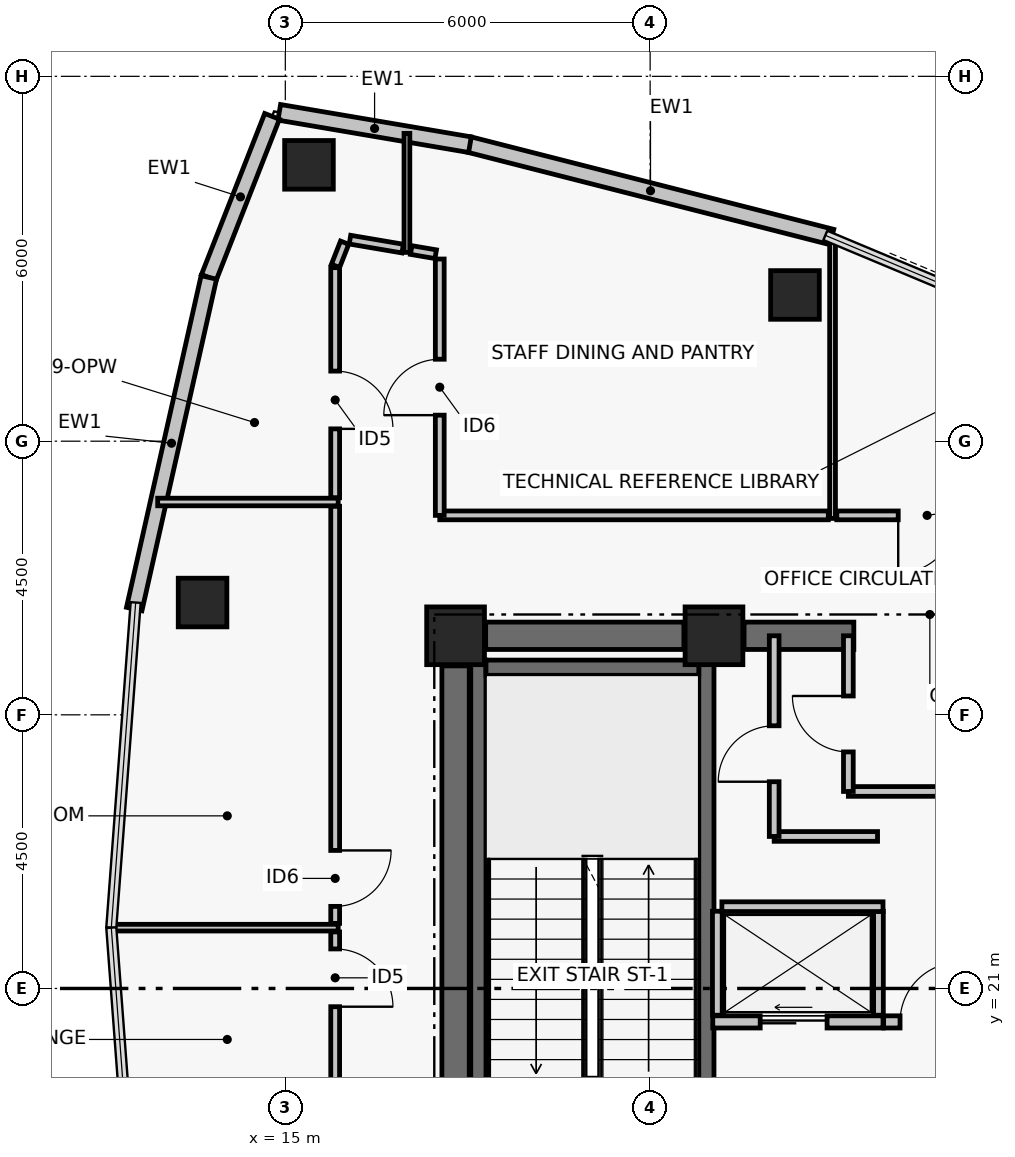
"""IFC4 building model, lengths in metres.
Left out: names, types, materials, properties, quantities, classifications, styles, units other than length and angle.
Written with IfcOpenShell. Run it as: python <this file> out.ifc"""

import sys

from ifc_helpers import new_model, si_unit, direction, frame, frame_2d, origin, origin_2d, place, context, subcontext, project, spatial, rectangle, hollow_rectangle, extrude, element, fill, save


model = new_model("IFC4")
c1 = context("Model", 3, precision=1e-05, world=origin(), true_north=direction((0.0, 1.0)))
c2 = subcontext(c1, "Body", "Model", "MODEL_VIEW")
j1 = project(units=[si_unit("LENGTHUNIT", "METRE"), si_unit("PLANEANGLEUNIT", "RADIAN")], contexts=[c1])
p1 = place(None, origin())
s1 = spatial("IfcSite", under=j1, at=p1, CompositionType="ELEMENT")
p2 = place(p1, origin())
s2 = spatial("IfcBuilding", under=s1, at=p2, CompositionType="ELEMENT")
p3 = place(p2, frame((0.0, 0.0, 291.78)))
s3 = spatial("IfcBuildingStorey", under=s2, at=p3, CompositionType="ELEMENT", Elevation=291.78)
for number, where, z_axis, x_axis in (
    (1, (17.8, 26.8, 0.0), (0.0, 0.0, 1.0), (1.0, 0.0, 0.0)),
    (2, (22.05, 26.8, 0.0), (0.0, 0.0, 1.0), (1.0, 0.0, 0.0)),
):
    element("IfcColumn", number, at=place(p3, frame(where, z_axis=z_axis, x_axis=x_axis)), inside=s3, PredefinedType="COLUMN", context=c2, shape_type="SweptSolid", body=[
        extrude(rectangle(XDim=0.95, YDim=0.95, at=origin_2d()), origin(), (0.0, 0.0, 1.0), 3.72),
    ])
p4 = place(p3, frame((18.295, 26.8, 0.0), z_axis=(0.0, 0.0, 1.0), x_axis=(1.0, 0.0, 0.0)))
e3 = element("IfcWall", 3, at=p4, inside=s3, PredefinedType="SHEAR", context=c2, shape_type="SweptSolid", body=[
    extrude(rectangle(XDim=3.26, YDim=0.45, at=frame_2d((1.63, 0.0))), origin(), (0.0, 0.0, 1.0), 3.5),
])
p5 = place(p3, frame((22.545, 26.8, 0.0), z_axis=(0.0, 0.0, 1.0), x_axis=(1.0, 0.0, 0.0)))
e4 = element("IfcWall", 4, at=p5, inside=s3, PredefinedType="SHEAR", context=c2, shape_type="SweptSolid", body=[
    extrude(rectangle(XDim=1.805, YDim=0.45, at=frame_2d((0.903, 0.0))), origin(), (0.0, 0.0, 1.0), 3.5),
])
p6 = place(p3, frame((17.8, 17.695, 0.0), z_axis=(0.0, 0.0, 1.0), x_axis=(0.0, 1.0, 0.0)))
e5 = element("IfcWall", 5, at=p6, inside=s3, PredefinedType="SHEAR", context=c2, shape_type="SweptSolid", body=[
    extrude(rectangle(XDim=8.61, YDim=0.45, at=frame_2d((4.305, 0.0))), origin(), (0.0, 0.0, 1.0), 3.5),
])
p7 = place(p3, frame((18.175, 17.6, 0.0), z_axis=(0.0, 0.0, 1.0), x_axis=(0.0, 1.0, 0.0)))
e6 = element("IfcWall", 6, at=p7, inside=s3, PredefinedType="SHEAR", context=c2, shape_type="SweptSolid", body=[
    extrude(rectangle(XDim=8.8, YDim=0.25, at=frame_2d((4.4, 0.0))), origin(), (0.0, 0.0, 1.0), 3.5),
])
p8 = place(p3, frame((21.925, 17.6, 0.0), z_axis=(0.0, 0.0, 1.0), x_axis=(0.0, 1.0, 0.0)))
e7 = element("IfcWall", 7, at=p8, inside=s3, PredefinedType="SHEAR", context=c2, shape_type="SweptSolid", body=[
    extrude(rectangle(XDim=8.8, YDim=0.25, at=frame_2d((4.4, 0.0))), origin(), (0.0, 0.0, 1.0), 3.5),
])
p9 = place(p8, frame((0.35, 0.0, 0.0)))
e8 = element("IfcOpeningElement", 8, at=p9, cuts=e7, PredefinedType="OPENING", context=c2, shape_type="SweptSolid", body=[
    extrude(rectangle(XDim=1.05, YDim=2.08, at=frame_2d((0.525, 1.04))), frame((0.0, 0.135, 0.0), z_axis=(0.0, -1.0, 0.0), x_axis=(1.0, 0.0, 0.0)), (0.0, 0.0, 1.0), 0.27),
])
p10 = place(p3, frame((18.3, 26.275, 0.0), z_axis=(0.0, 0.0, 1.0), x_axis=(1.0, 0.0, 0.0)))
e9 = element("IfcWall", 9, at=p10, inside=s3, PredefinedType="SHEAR", context=c2, shape_type="SweptSolid", body=[
    extrude(rectangle(XDim=3.5, YDim=0.25, at=frame_2d((1.75, 0.0))), origin(), (0.0, 0.0, 1.0), 3.5),
])
for number, where, z_axis, x_axis in (
    (10, (23.382, 32.405, 0.0), (0.0, 0.0, 1.0), (1.0, 0.0, 0.0)),
    (11, (15.389, 34.545, 0.0), (0.0, 0.0, 1.0), (1.0, 0.0, 0.0)),
    (12, (13.639, 27.347, 0.0), (0.0, 0.0, 1.0), (1.0, 0.0, 0.0)),
):
    element("IfcColumn", number, at=place(p3, frame(where, z_axis=z_axis, x_axis=x_axis)), inside=s3, PredefinedType="COLUMN", context=c2, shape_type="SweptSolid", body=[
        extrude(hollow_rectangle(XDim=0.8, YDim=0.8, WallThickness=0.035, at=origin_2d()), origin(), (0.0, 0.0, 1.0), 3.72),
    ])
p11 = place(p3, frame((18.024, 34.879, 0.0), z_axis=(0.0, 0.0, 1.0), x_axis=(0.968988278672, -0.247106689096, 0.0)))
e13 = element("IfcWall", 13, at=p11, inside=s3, PredefinedType="PARTITIONING", context=c2, shape_type="SweptSolid", body=[
    extrude(rectangle(XDim=6.154, YDim=0.26, at=frame_2d((3.077, 0.0))), origin(), (0.0, 0.0, 1.0), 3.5),
])
p12 = place(p3, frame((14.9, 35.409, 0.0), z_axis=(0.0, 0.0, 1.0), x_axis=(0.985889432766, -0.167397808709, 0.0)))
e14 = element("IfcWall", 14, at=p12, inside=s3, PredefinedType="PARTITIONING", context=c2, shape_type="SweptSolid", body=[
    extrude(rectangle(XDim=3.181, YDim=0.26, at=frame_2d((1.59, 0.0))), origin(), (0.0, 0.0, 1.0), 3.5),
])
p13 = place(p3, frame((13.742, 32.693, 0.0), z_axis=(0.0, 0.0, 1.0), x_axis=(0.36559927932, 0.930772349697, 0.0)))
e15 = element("IfcWall", 15, at=p13, inside=s3, PredefinedType="PARTITIONING", context=c2, shape_type="SweptSolid", body=[
    extrude(rectangle(XDim=2.845, YDim=0.26, at=frame_2d((1.423, 0.0))), origin(), (0.0, 0.0, 1.0), 3.5),
])
p14 = place(p3, frame((12.515, 27.24, 0.0), z_axis=(0.0, 0.0, 1.0), x_axis=(0.219500763731, 0.97561232809, 0.0)))
e16 = element("IfcWall", 16, at=p14, inside=s3, PredefinedType="PARTITIONING", context=c2, shape_type="SweptSolid", body=[
    extrude(rectangle(XDim=5.59, YDim=0.26, at=frame_2d((2.795, 0.0))), origin(), (0.0, 0.0, 1.0), 3.5),
])
p15 = place(p3, frame((24.84, 20.45, 0.0), z_axis=(0.0, 0.0, 1.0), x_axis=(1.0, 0.0, 0.0)))
e17 = element("IfcWall", 17, at=p15, inside=s3, PredefinedType="PARTITIONING", context=c2, shape_type="SweptSolid", body=[
    extrude(rectangle(XDim=1.52, YDim=0.2, at=frame_2d((0.76, 0.0))), origin(), (0.0, 0.0, 1.0), 3.5),
])
p16 = place(p15, frame((0.27, 0.0, 0.0)))
e18 = element("IfcOpeningElement", 18, at=p16, cuts=e17, PredefinedType="OPENING", context=c2, shape_type="SweptSolid", body=[
    extrude(rectangle(XDim=0.98, YDim=2.06, at=frame_2d((0.49, 1.03))), frame((0.0, 0.11, 0.0), z_axis=(0.0, -1.0, 0.0), x_axis=(1.0, 0.0, 0.0)), (0.0, 0.0, 1.0), 0.22),
])
p17 = place(p3, frame((22.03, 20.45, 0.0), z_axis=(0.0, 0.0, 1.0), x_axis=(1.0, 0.0, 0.0)))
e19 = element("IfcWall", 19, at=p17, inside=s3, PredefinedType="PARTITIONING", context=c2, shape_type="SweptSolid", body=[
    extrude(rectangle(XDim=2.8, YDim=0.2, at=frame_2d((1.4, 0.0))), origin(), (0.0, 0.0, 1.0), 3.5),
])
p18 = place(p17, frame((0.78, 0.0, 0.0)))
e20 = element("IfcOpeningElement", 20, at=p18, cuts=e19, PredefinedType="OPENING", context=c2, shape_type="SweptSolid", body=[
    extrude(rectangle(XDim=1.1, YDim=2.08, at=frame_2d((0.55, 1.04))), frame((0.0, 0.11, 0.0), z_axis=(0.0, -1.0, 0.0), x_axis=(1.0, 0.0, 0.0)), (0.0, 0.0, 1.0), 0.22),
])
for number, where, z_axis, x_axis in (
    (21, (22.105, 20.56, 0.0), (0.0, 0.0, 1.0), (0.0, 1.0, 0.0)),
    (22, (24.755, 20.56, 0.0), (0.0, 0.0, 1.0), (0.0, 1.0, 0.0)),
):
    element("IfcWall", number, at=place(p3, frame(where, z_axis=z_axis, x_axis=x_axis)), inside=s3, PredefinedType="PARTITIONING", context=c2, shape_type="SweptSolid", body=[
        extrude(rectangle(XDim=1.71, YDim=0.16, at=frame_2d((0.855, 0.0))), origin(), (0.0, 0.0, 1.0), 3.5),
    ])
p19 = place(p3, frame((22.18, 22.345, 0.0), z_axis=(0.0, 0.0, 1.0), x_axis=(1.0, 0.0, 0.0)))
e23 = element("IfcWall", 23, at=p19, inside=s3, PredefinedType="PARTITIONING", context=c2, shape_type="SweptSolid", body=[
    extrude(rectangle(XDim=2.65, YDim=0.16, at=frame_2d((1.325, 0.0))), origin(), (0.0, 0.0, 1.0), 3.5),
])
p20 = place(p3, frame((23.04, 23.5, 0.0), z_axis=(0.0, 0.0, 1.0), x_axis=(1.0, 0.0, 0.0)))
e24 = element("IfcWall", 24, at=p20, inside=s3, PredefinedType="PARTITIONING", context=c2, shape_type="SweptSolid", body=[
    extrude(rectangle(XDim=1.7, YDim=0.16, at=frame_2d((0.85, 0.0))), origin(), (0.0, 0.0, 1.0), 3.5),
])
p21 = place(p3, frame((23.04, 23.5, 0.0), z_axis=(0.0, 0.0, 1.0), x_axis=(0.0, 1.0, 0.0)))
e25 = element("IfcWall", 25, at=p21, inside=s3, PredefinedType="PARTITIONING", context=c2, shape_type="SweptSolid", body=[
    extrude(rectangle(XDim=3.3, YDim=0.16, at=frame_2d((1.65, 0.0))), origin(), (0.0, 0.0, 1.0), 2.63),
])
p22 = place(p21, frame((0.9, 0.0, 0.0)))
e26 = element("IfcOpeningElement", 26, at=p22, cuts=e25, PredefinedType="OPENING", context=c2, shape_type="SweptSolid", body=[
    extrude(rectangle(XDim=0.92, YDim=2.05, at=frame_2d((0.46, 1.025))), frame((0.0, 0.09, 0.0), z_axis=(0.0, -1.0, 0.0), x_axis=(1.0, 0.0, 0.0)), (0.0, 0.0, 1.0), 0.18),
])
p23 = place(p3, frame((24.26, 24.24, 0.0), z_axis=(0.0, 0.0, 1.0), x_axis=(1.0, 0.0, 0.0)))
e27 = element("IfcWall", 27, at=p23, inside=s3, PredefinedType="PARTITIONING", context=c2, shape_type="SweptSolid", body=[
    extrude(rectangle(XDim=2.2, YDim=0.16, at=frame_2d((1.1, 0.0))), origin(), (0.0, 0.0, 1.0), 3.5),
])
p24 = place(p3, frame((24.26, 24.24, 0.0), z_axis=(0.0, 0.0, 1.0), x_axis=(0.0, 1.0, 0.0)))
e28 = element("IfcWall", 28, at=p24, inside=s3, PredefinedType="PARTITIONING", context=c2, shape_type="SweptSolid", body=[
    extrude(rectangle(XDim=2.56, YDim=0.16, at=frame_2d((1.28, 0.0))), origin(), (0.0, 0.0, 1.0), 2.63),
])
p25 = place(p24, frame((0.65, 0.0, 0.0)))
e29 = element("IfcOpeningElement", 29, at=p25, cuts=e28, PredefinedType="OPENING", context=c2, shape_type="SweptSolid", body=[
    extrude(rectangle(XDim=0.92, YDim=2.05, at=frame_2d((0.46, 1.025))), frame((0.0, 0.09, 0.0), z_axis=(0.0, -1.0, 0.0), x_axis=(1.0, 0.0, 0.0)), (0.0, 0.0, 1.0), 0.18),
])
p26 = place(p3, frame((15.82, 21.93, 0.0), z_axis=(0.0, 0.0, 1.0), x_axis=(0.0, -1.0, 0.0)))
e30 = element("IfcWall", 30, at=p26, inside=s3, PredefinedType="PARTITIONING", context=c2, shape_type="SweptSolid", body=[
    extrude(rectangle(XDim=6.86, YDim=0.145, at=frame_2d((3.43, 0.0))), origin(), (0.0, 0.0, 1.0), 2.83),
])
p27 = place(p26, frame((0.28, 0.0, 0.0)))
e31 = element("IfcOpeningElement", 31, at=p27, cuts=e30, PredefinedType="OPENING", context=c2, shape_type="SweptSolid", body=[
    extrude(rectangle(XDim=0.95, YDim=2.06, at=frame_2d((0.475, 1.03))), frame((0.0, 0.083, 0.0), z_axis=(0.0, -1.0, 0.0), x_axis=(1.0, 0.0, 0.0)), (0.0, 0.0, 1.0), 0.165),
])
p28 = place(p3, frame((28.5, 28.78, 0.0), z_axis=(0.0, 0.0, 1.0), x_axis=(-1.0, 0.0, 0.0)))
e32 = element("IfcWall", 32, at=p28, inside=s3, PredefinedType="PARTITIONING", context=c2, shape_type="SweptSolid", body=[
    extrude(rectangle(XDim=4.43, YDim=0.145, at=frame_2d((2.215, 0.0))), origin(), (0.0, 0.0, 1.0), 3.5),
])
p29 = place(p28, frame((2.47, 0.0, 0.0)))
e33 = element("IfcOpeningElement", 33, at=p29, cuts=e32, PredefinedType="OPENING", context=c2, shape_type="SweptSolid", body=[
    extrude(rectangle(XDim=0.95, YDim=2.06, at=frame_2d((0.475, 1.03))), frame((0.0, 0.083, 0.0), z_axis=(0.0, -1.0, 0.0), x_axis=(1.0, 0.0, 0.0)), (0.0, 0.0, 1.0), 0.165),
])
p30 = place(p3, frame((23.93, 28.78, 0.0), z_axis=(0.0, 0.0, 1.0), x_axis=(-1.0, 0.0, 0.0)))
e34 = element("IfcWall", 34, at=p30, inside=s3, PredefinedType="PARTITIONING", context=c2, shape_type="SweptSolid", body=[
    extrude(rectangle(XDim=6.39, YDim=0.145, at=frame_2d((3.195, 0.0))), origin(), (0.0, 0.0, 1.0), 2.83),
])
p31 = place(p3, frame((17.54, 28.78, 0.0), z_axis=(0.0, 0.0, 1.0), x_axis=(0.0, 1.0, 0.0)))
e35 = element("IfcWall", 35, at=p31, inside=s3, PredefinedType="PARTITIONING", context=c2, shape_type="SweptSolid", body=[
    extrude(rectangle(XDim=4.216, YDim=0.145, at=frame_2d((2.108, 0.0))), origin(), (0.0, 0.0, 1.0), 3.13),
])
p32 = place(p31, frame((1.648, 0.0, 0.0)))
e36 = element("IfcOpeningElement", 36, at=p32, cuts=e35, PredefinedType="OPENING", context=c2, shape_type="SweptSolid", body=[
    extrude(rectangle(XDim=0.92, YDim=2.05, at=frame_2d((0.46, 1.025))), frame((0.0, 0.083, 0.0), z_axis=(0.0, -1.0, 0.0), x_axis=(1.0, 0.0, 0.0)), (0.0, 0.0, 1.0), 0.165),
])
p33 = place(p3, frame((17.473, 33.075, 0.0), z_axis=(0.0, 0.0, 1.0), x_axis=(-0.985840066474, 0.167688292179, 0.0)))
e37 = element("IfcWall", 37, at=p33, inside=s3, PredefinedType="PARTITIONING", context=c2, shape_type="SweptSolid", body=[
    extrude(rectangle(XDim=0.409, YDim=0.145, at=frame_2d((0.205, 0.0))), origin(), (0.0, 0.0, 1.0), 3.5),
])
p34 = place(p3, frame((16.93, 33.167, 0.0), z_axis=(0.0, 0.0, 1.0), x_axis=(-0.985878779942, 0.167460536424, 0.0)))
e38 = element("IfcWall", 38, at=p34, inside=s3, PredefinedType="PARTITIONING", context=c2, shape_type="SweptSolid", body=[
    extrude(rectangle(XDim=0.879, YDim=0.145, at=frame_2d((0.439, 0.0))), origin(), (0.0, 0.0, 1.0), 3.13),
])
p35 = place(p3, frame((15.975, 33.265, 0.0), z_axis=(0.0, 0.0, 1.0), x_axis=(-0.365633948196, -0.930758731319, 0.0)))
e39 = element("IfcWall", 39, at=p35, inside=s3, PredefinedType="PARTITIONING", context=c2, shape_type="SweptSolid", body=[
    extrude(rectangle(XDim=0.41, YDim=0.145, at=frame_2d((0.205, 0.0))), origin(), (0.0, 0.0, 1.0), 2.83),
])
p36 = place(p3, frame((15.82, 32.854, 0.0), z_axis=(0.0, 0.0, 1.0), x_axis=(0.0, -1.0, 0.0)))
e40 = element("IfcWall", 40, at=p36, inside=s3, PredefinedType="PARTITIONING", context=c2, shape_type="SweptSolid", body=[
    extrude(rectangle(XDim=3.784, YDim=0.145, at=frame_2d((1.892, 0.0))), origin(), (0.0, 0.0, 1.0), 2.83),
])
p37 = place(p36, frame((1.701, 0.0, 0.0)))
e41 = element("IfcOpeningElement", 41, at=p37, cuts=e40, PredefinedType="OPENING", context=c2, shape_type="SweptSolid", body=[
    extrude(rectangle(XDim=0.95, YDim=2.06, at=frame_2d((0.475, 1.03))), frame((0.0, 0.083, 0.0), z_axis=(0.0, -1.0, 0.0), x_axis=(1.0, 0.0, 0.0)), (0.0, 0.0, 1.0), 0.165),
])
p38 = place(p3, frame((15.82, 28.93, 0.0), z_axis=(0.0, 0.0, 1.0), x_axis=(0.0, -1.0, 0.0)))
e42 = element("IfcWall", 42, at=p38, inside=s3, PredefinedType="PARTITIONING", context=c2, shape_type="SweptSolid", body=[
    extrude(rectangle(XDim=6.86, YDim=0.145, at=frame_2d((3.43, 0.0))), origin(), (0.0, 0.0, 1.0), 2.83),
])
p39 = place(p38, frame((5.66, 0.0, 0.0)))
e43 = element("IfcOpeningElement", 43, at=p39, cuts=e42, PredefinedType="OPENING", context=c2, shape_type="SweptSolid", body=[
    extrude(rectangle(XDim=0.92, YDim=2.05, at=frame_2d((0.46, 1.025))), frame((0.0, 0.083, 0.0), z_axis=(0.0, -1.0, 0.0), x_axis=(1.0, 0.0, 0.0)), (0.0, 0.0, 1.0), 0.165),
])
p40 = place(p3, frame((17.0, 33.104, 0.0), z_axis=(0.0, 0.0, 1.0), x_axis=(0.0, 1.0, 0.0)))
e44 = element("IfcWall", 44, at=p40, inside=s3, PredefinedType="PARTITIONING", context=c2, shape_type="SweptSolid", body=[
    extrude(rectangle(XDim=1.958, YDim=0.095, at=frame_2d((0.979, 0.0))), origin(), (0.0, 0.0, 1.0), 2.98),
])
p41 = place(p3, frame((24.0, 28.73, 0.0), z_axis=(0.0, 0.0, 1.0), x_axis=(0.0, 1.0, 0.0)))
e45 = element("IfcWall", 45, at=p41, inside=s3, PredefinedType="PARTITIONING", context=c2, shape_type="SweptSolid", body=[
    extrude(rectangle(XDim=4.616, YDim=0.095, at=frame_2d((2.308, 0.0))), origin(), (0.0, 0.0, 1.0), 2.98),
])
p42 = place(p3, frame((12.128, 22.0, 0.0), z_axis=(0.0, 0.0, 1.0), x_axis=(1.0, 0.0, 0.0)))
e46 = element("IfcWall", 46, at=p42, inside=s3, PredefinedType="PARTITIONING", context=c2, shape_type="SweptSolid", body=[
    extrude(rectangle(XDim=3.742, YDim=0.11, at=frame_2d((1.871, 0.0))), origin(), (0.0, 0.0, 1.0), 2.98),
])
p43 = place(p3, frame((12.901, 29.0, 0.0), z_axis=(0.0, 0.0, 1.0), x_axis=(1.0, 0.0, 0.0)))
e47 = element("IfcWall", 47, at=p43, inside=s3, PredefinedType="PARTITIONING", context=c2, shape_type="SweptSolid", body=[
    extrude(rectangle(XDim=2.969, YDim=0.125, at=frame_2d((1.485, 0.0))), origin(), (0.0, 0.0, 1.0), 2.98),
])
p44 = place(p16, origin())
e48 = element("IfcDoor", 48, at=p44, inside=s3, OperationType="SINGLE_SWING_RIGHT", PredefinedType="DOOR", context=c2, shape_type="SweptSolid", body=[
    extrude(rectangle(XDim=0.98, YDim=2.06, at=frame_2d((0.49, 1.03))), frame((0.0, 0.025, 0.0), z_axis=(0.0, -1.0, 0.0), x_axis=(1.0, 0.0, 0.0)), (0.0, 0.0, 1.0), 0.05),
])
fill(e18, e48)
p45 = place(p18, origin())
e49 = element("IfcDoor", 49, at=p45, inside=s3, OperationType="DOUBLE_DOOR_SLIDING", PredefinedType="DOOR", context=c2, shape_type="SweptSolid", body=[
    extrude(rectangle(XDim=1.1, YDim=2.08, at=frame_2d((0.55, 1.04))), frame((0.0, 0.025, 0.0), z_axis=(0.0, -1.0, 0.0), x_axis=(1.0, 0.0, 0.0)), (0.0, 0.0, 1.0), 0.05),
])
fill(e20, e49)
p46 = place(p22, origin())
e50 = element("IfcDoor", 50, at=p46, inside=s3, OperationType="SINGLE_SWING_LEFT", PredefinedType="DOOR", context=c2, shape_type="SweptSolid", body=[
    extrude(rectangle(XDim=0.92, YDim=2.05, at=frame_2d((0.46, 1.025))), frame((0.0, 0.025, 0.0), z_axis=(0.0, -1.0, 0.0), x_axis=(1.0, 0.0, 0.0)), (0.0, 0.0, 1.0), 0.05),
])
fill(e26, e50)
p47 = place(p25, origin())
e51 = element("IfcDoor", 51, at=p47, inside=s3, OperationType="SINGLE_SWING_RIGHT", PredefinedType="DOOR", context=c2, shape_type="SweptSolid", body=[
    extrude(rectangle(XDim=0.92, YDim=2.05, at=frame_2d((0.46, 1.025))), frame((0.0, 0.025, 0.0), z_axis=(0.0, -1.0, 0.0), x_axis=(1.0, 0.0, 0.0)), (0.0, 0.0, 1.0), 0.05),
])
fill(e29, e51)
p48 = place(p27, origin())
e52 = element("IfcDoor", 52, at=p48, inside=s3, OperationType="SINGLE_SWING_RIGHT", PredefinedType="DOOR", context=c2, shape_type="SweptSolid", body=[
    extrude(rectangle(XDim=0.95, YDim=2.06, at=frame_2d((0.475, 1.03))), frame((0.0, 0.025, 0.0), z_axis=(0.0, -1.0, 0.0), x_axis=(1.0, 0.0, 0.0)), (0.0, 0.0, 1.0), 0.05),
])
fill(e31, e52)
p49 = place(p29, origin())
e53 = element("IfcDoor", 53, at=p49, inside=s3, OperationType="SINGLE_SWING_RIGHT", PredefinedType="DOOR", context=c2, shape_type="SweptSolid", body=[
    extrude(rectangle(XDim=0.95, YDim=2.06, at=frame_2d((0.475, 1.03))), frame((0.0, 0.025, 0.0), z_axis=(0.0, -1.0, 0.0), x_axis=(1.0, 0.0, 0.0)), (0.0, 0.0, 1.0), 0.05),
])
fill(e33, e53)
p50 = place(p32, origin())
e54 = element("IfcDoor", 54, at=p50, inside=s3, OperationType="SINGLE_SWING_LEFT", PredefinedType="DOOR", context=c2, shape_type="SweptSolid", body=[
    extrude(rectangle(XDim=0.92, YDim=2.05, at=frame_2d((0.46, 1.025))), frame((0.0, 0.025, 0.0), z_axis=(0.0, -1.0, 0.0), x_axis=(1.0, 0.0, 0.0)), (0.0, 0.0, 1.0), 0.05),
])
fill(e36, e54)
p51 = place(p37, origin())
e55 = element("IfcDoor", 55, at=p51, inside=s3, OperationType="SINGLE_SWING_RIGHT", PredefinedType="DOOR", context=c2, shape_type="SweptSolid", body=[
    extrude(rectangle(XDim=0.95, YDim=2.06, at=frame_2d((0.475, 1.03))), frame((0.0, 0.025, 0.0), z_axis=(0.0, -1.0, 0.0), x_axis=(1.0, 0.0, 0.0)), (0.0, 0.0, 1.0), 0.05),
])
fill(e41, e55)
p52 = place(p39, origin())
e56 = element("IfcDoor", 56, at=p52, inside=s3, OperationType="SINGLE_SWING_LEFT", PredefinedType="DOOR", context=c2, shape_type="SweptSolid", body=[
    extrude(rectangle(XDim=0.92, YDim=2.05, at=frame_2d((0.46, 1.025))), frame((0.0, 0.025, 0.0), z_axis=(0.0, -1.0, 0.0), x_axis=(1.0, 0.0, 0.0)), (0.0, 0.0, 1.0), 0.05),
])
fill(e43, e56)
save(model, sys.argv[1])
